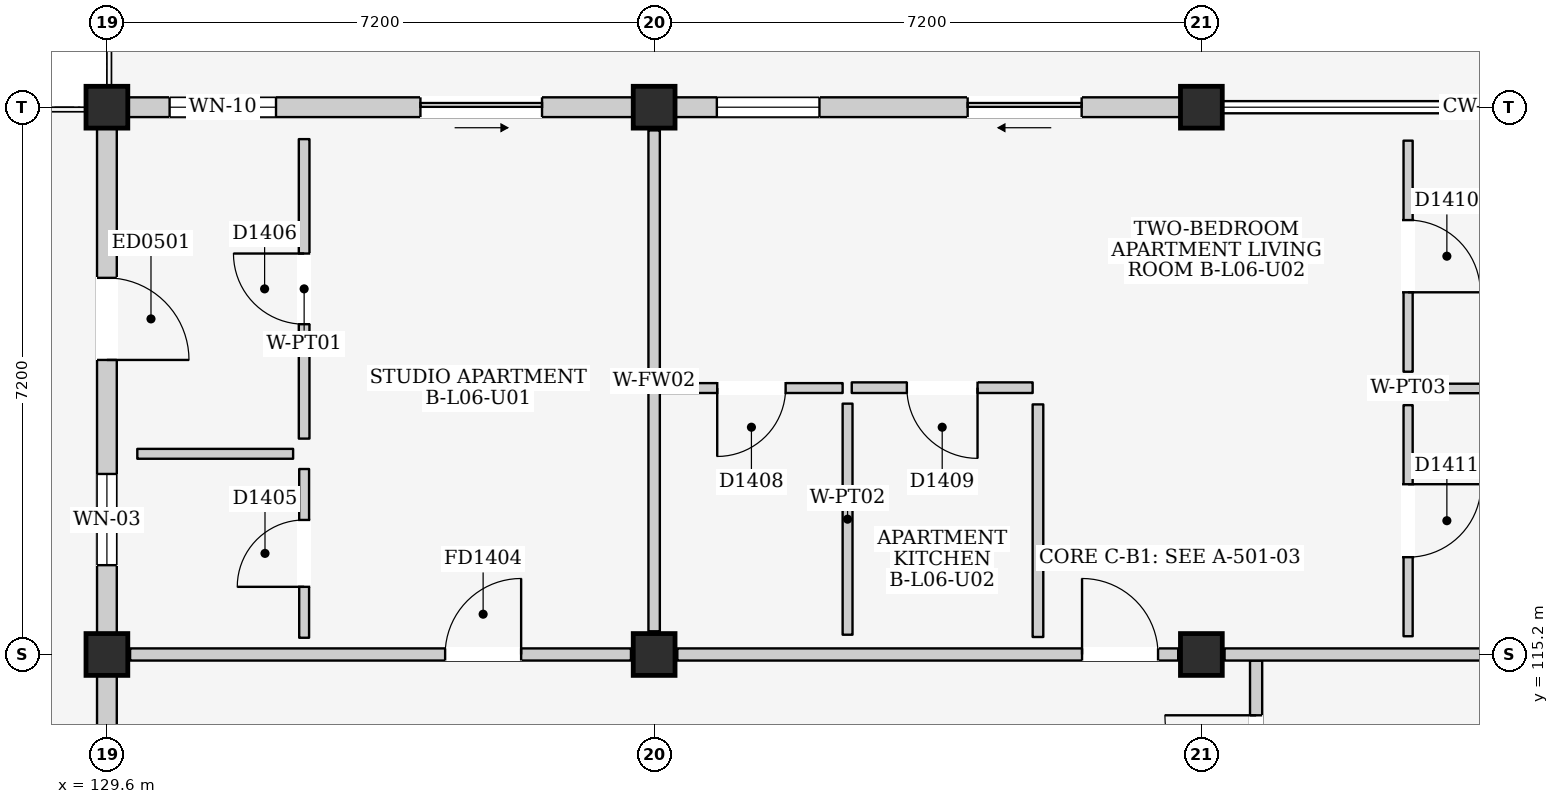
"""IFC4 building model, lengths in metres.
Left out: names, types, materials, properties, quantities, classifications, styles, units other than length and angle.
Written with IfcOpenShell. Run it as: python <this file> out.ifc"""

import sys

from ifc_helpers import new_model, si_unit, direction, frame, frame_2d, origin, origin_2d, place, context, subcontext, project, spatial, rectangle, extrude, element, fill, save


model = new_model("IFC4")
c1 = context("Model", 3, precision=1e-05, world=origin(), true_north=direction((0.0, 1.0)))
c2 = subcontext(c1, "Body", "Model", "MODEL_VIEW")
j1 = project(units=[si_unit("LENGTHUNIT", "METRE"), si_unit("PLANEANGLEUNIT", "RADIAN")], contexts=[c1])
p1 = place(None, origin())
s1 = spatial("IfcSite", under=j1, at=p1, CompositionType="ELEMENT")
p2 = place(p1, origin())
s2 = spatial("IfcBuilding", under=s1, at=p2, CompositionType="ELEMENT")
p3 = place(p2, frame((0.0, 0.0, 21.9)))
s3 = spatial("IfcBuildingStorey", under=s2, at=p3, CompositionType="ELEMENT", Elevation=21.9)
for number, where, z_axis, x_axis in (
    (1, (129.6, 115.2, 0.0), (0.0, 0.0, 1.0), (1.0, 0.0, 0.0)),
    (2, (129.6, 122.4, 0.0), (0.0, 0.0, 1.0), (1.0, 0.0, 0.0)),
    (3, (136.8, 115.2, 0.0), (0.0, 0.0, 1.0), (1.0, 0.0, 0.0)),
    (4, (136.8, 122.4, 0.0), (0.0, 0.0, 1.0), (1.0, 0.0, 0.0)),
    (5, (144.0, 115.2, 0.0), (0.0, 0.0, 1.0), (1.0, 0.0, 0.0)),
    (6, (144.0, 122.4, 0.0), (0.0, 0.0, 1.0), (1.0, 0.0, 0.0)),
):
    element("IfcColumn", number, at=place(p3, frame(where, z_axis=z_axis, x_axis=x_axis)), inside=s3, PredefinedType="COLUMN", context=c2, shape_type="SweptSolid", body=[
        extrude(rectangle(XDim=0.55, YDim=0.55, at=origin_2d()), origin(), (0.0, 0.0, 1.0), 3.2),
    ])
p4 = place(p3, frame((129.6, 108.275, 0.0), z_axis=(0.0, 0.0, 1.0), x_axis=(0.0, 1.0, 0.0)))
e7 = element("IfcWall", 7, at=p4, inside=s3, PredefinedType="ELEMENTEDWALL", context=c2, shape_type="SweptSolid", body=[
    extrude(rectangle(XDim=6.65, YDim=0.26, at=frame_2d((3.325, 0.0))), origin(), (0.0, 0.0, 1.0), 2.465),
])
p5 = place(p4, frame((2.825, 0.0, 1.1)))
e8 = element("IfcOpeningElement", 8, at=p5, cuts=e7, PredefinedType="OPENING", context=c2, shape_type="SweptSolid", body=[
    extrude(rectangle(XDim=1.0, YDim=0.9, at=frame_2d((0.5, 0.45))), frame((0.0, 0.145, 0.0), z_axis=(0.0, -1.0, 0.0), x_axis=(1.0, 0.0, 0.0)), (0.0, 0.0, 1.0), 0.29),
])
p6 = place(p3, frame((129.875, 122.4, 0.0), z_axis=(0.0, 0.0, 1.0), x_axis=(1.0, 0.0, 0.0)))
e9 = element("IfcWall", 9, at=p6, inside=s3, PredefinedType="ELEMENTEDWALL", context=c2, shape_type="SweptSolid", body=[
    extrude(rectangle(XDim=6.65, YDim=0.26, at=frame_2d((3.325, 0.0))), origin(), (0.0, 0.0, 1.0), 2.515),
])
p7 = place(p6, frame((3.85, 0.0, 0.0)))
e10 = element("IfcOpeningElement", 10, at=p7, cuts=e9, PredefinedType="OPENING", context=c2, shape_type="SweptSolid", body=[
    extrude(rectangle(XDim=1.6, YDim=2.12, at=frame_2d((0.8, 1.06))), frame((0.0, 0.145, 0.0), z_axis=(0.0, -1.0, 0.0), x_axis=(1.0, 0.0, 0.0)), (0.0, 0.0, 1.0), 0.29),
])
p8 = place(p6, frame((0.55, 0.0, 0.9)))
e11 = element("IfcOpeningElement", 11, at=p8, cuts=e9, PredefinedType="OPENING", context=c2, shape_type="SweptSolid", body=[
    extrude(rectangle(XDim=1.4, YDim=1.2, at=frame_2d((0.7, 0.6))), frame((0.0, 0.145, 0.0), z_axis=(0.0, -1.0, 0.0), x_axis=(1.0, 0.0, 0.0)), (0.0, 0.0, 1.0), 0.29),
])
p9 = place(p3, frame((129.6, 115.475, 0.0), z_axis=(0.0, 0.0, 1.0), x_axis=(0.0, 1.0, 0.0)))
e12 = element("IfcWall", 12, at=p9, inside=s3, PredefinedType="ELEMENTEDWALL", context=c2, shape_type="SweptSolid", body=[
    extrude(rectangle(XDim=6.65, YDim=0.26, at=frame_2d((3.325, 0.0))), origin(), (0.0, 0.0, 1.0), 2.465),
])
p10 = place(p9, frame((3.6, 0.0, 0.0)))
e13 = element("IfcOpeningElement", 13, at=p10, cuts=e12, PredefinedType="OPENING", context=c2, shape_type="SweptSolid", body=[
    extrude(rectangle(XDim=1.08, YDim=2.12, at=frame_2d((0.54, 1.06))), frame((0.0, 0.145, 0.0), z_axis=(0.0, -1.0, 0.0), x_axis=(1.0, 0.0, 0.0)), (0.0, 0.0, 1.0), 0.29),
])
p11 = place(p9, frame((0.9, 0.0, 0.95)))
e14 = element("IfcOpeningElement", 14, at=p11, cuts=e12, PredefinedType="OPENING", context=c2, shape_type="SweptSolid", body=[
    extrude(rectangle(XDim=1.2, YDim=1.35, at=frame_2d((0.6, 0.675))), frame((0.0, 0.145, 0.0), z_axis=(0.0, -1.0, 0.0), x_axis=(1.0, 0.0, 0.0)), (0.0, 0.0, 1.0), 0.29),
])
p12 = place(p3, frame((137.075, 122.4, 0.0), z_axis=(0.0, 0.0, 1.0), x_axis=(1.0, 0.0, 0.0)))
e15 = element("IfcWall", 15, at=p12, inside=s3, PredefinedType="ELEMENTEDWALL", context=c2, shape_type="SweptSolid", body=[
    extrude(rectangle(XDim=6.65, YDim=0.26, at=frame_2d((3.325, 0.0))), origin(), (0.0, 0.0, 1.0), 2.515),
])
p13 = place(p12, frame((3.85, 0.0, 0.0)))
e16 = element("IfcOpeningElement", 16, at=p13, cuts=e15, PredefinedType="OPENING", context=c2, shape_type="SweptSolid", body=[
    extrude(rectangle(XDim=1.5, YDim=2.12, at=frame_2d((0.75, 1.06))), frame((0.0, 0.145, 0.0), z_axis=(0.0, -1.0, 0.0), x_axis=(1.0, 0.0, 0.0)), (0.0, 0.0, 1.0), 0.29),
])
p14 = place(p12, frame((0.55, 0.0, 0.9)))
e17 = element("IfcOpeningElement", 17, at=p14, cuts=e15, PredefinedType="OPENING", context=c2, shape_type="SweptSolid", body=[
    extrude(rectangle(XDim=1.35, YDim=1.5, at=frame_2d((0.675, 0.75))), frame((0.0, 0.145, 0.0), z_axis=(0.0, -1.0, 0.0), x_axis=(1.0, 0.0, 0.0)), (0.0, 0.0, 1.0), 0.29),
])
p15 = place(p3, frame((144.72, 111.1, 0.0), z_axis=(0.0, 0.0, 1.0), x_axis=(0.0, 1.0, 0.0)))
e18 = element("IfcWall", 18, at=p15, inside=s3, PredefinedType="PARTITIONING", context=c2, shape_type="SweptSolid", body=[
    extrude(rectangle(XDim=4.02, YDim=0.16, at=frame_2d((2.01, 0.0))), origin(), (0.0, 0.0, 1.0), 2.98),
])
p16 = place(p15, frame((2.1, 0.0, 0.0)))
e19 = element("IfcOpeningElement", 19, at=p16, cuts=e18, PredefinedType="OPENING", context=c2, shape_type="SweptSolid", body=[
    extrude(rectangle(XDim=1.2, YDim=2.2, at=frame_2d((0.6, 1.1))), frame((0.0, 0.095, 0.0), z_axis=(0.0, -1.0, 0.0), x_axis=(1.0, 0.0, 0.0)), (0.0, 0.0, 1.0), 0.19),
])
p17 = place(p3, frame((129.905, 115.2, 0.0), z_axis=(0.0, 0.0, 1.0), x_axis=(1.0, 0.0, 0.0)))
e20 = element("IfcWall", 20, at=p17, inside=s3, PredefinedType="PARTITIONING", context=c2, shape_type="SweptSolid", body=[
    extrude(rectangle(XDim=6.59, YDim=0.16, at=frame_2d((3.295, 0.0))), origin(), (0.0, 0.0, 1.0), 2.365),
])
p18 = place(p17, frame((4.145, 0.0, 0.0)))
e21 = element("IfcOpeningElement", 21, at=p18, cuts=e20, PredefinedType="OPENING", context=c2, shape_type="SweptSolid", body=[
    extrude(rectangle(XDim=1.0, YDim=2.15, at=frame_2d((0.5, 1.075))), frame((0.0, 0.095, 0.0), z_axis=(0.0, -1.0, 0.0), x_axis=(1.0, 0.0, 0.0)), (0.0, 0.0, 1.0), 0.19),
])
p19 = place(p3, frame((136.8, 115.505, 0.0), z_axis=(0.0, 0.0, 1.0), x_axis=(0.0, 1.0, 0.0)))
e22 = element("IfcWall", 22, at=p19, inside=s3, PredefinedType="PARTITIONING", context=c2, shape_type="SweptSolid", body=[
    extrude(rectangle(XDim=6.59, YDim=0.15, at=frame_2d((3.295, 0.0))), origin(), (0.0, 0.0, 1.0), 2.465),
])
p20 = place(p3, frame((130.0, 117.84, 0.0), z_axis=(0.0, 0.0, 1.0), x_axis=(1.0, 0.0, 0.0)))
e23 = element("IfcWall", 23, at=p20, inside=s3, PredefinedType="PARTITIONING", context=c2, shape_type="SweptSolid", body=[
    extrude(rectangle(XDim=2.05, YDim=0.13, at=frame_2d((1.025, 0.0))), origin(), (0.0, 0.0, 1.0), 2.98),
])
p21 = place(p3, frame((132.195, 115.42, 0.0), z_axis=(0.0, 0.0, 1.0), x_axis=(0.0, 1.0, 0.0)))
e24 = element("IfcWall", 24, at=p21, inside=s3, PredefinedType="PARTITIONING", context=c2, shape_type="SweptSolid", body=[
    extrude(rectangle(XDim=2.22, YDim=0.13, at=frame_2d((1.11, 0.0))), origin(), (0.0, 0.0, 1.0), 2.98),
])
p22 = place(p21, frame((0.67, 0.0, 0.0)))
e25 = element("IfcOpeningElement", 25, at=p22, cuts=e24, PredefinedType="OPENING", context=c2, shape_type="SweptSolid", body=[
    extrude(rectangle(XDim=0.88, YDim=2.1, at=frame_2d((0.44, 1.05))), frame((0.0, 0.08, 0.0), z_axis=(0.0, -1.0, 0.0), x_axis=(1.0, 0.0, 0.0)), (0.0, 0.0, 1.0), 0.16),
])
p23 = place(p3, frame((132.195, 118.04, 0.0), z_axis=(0.0, 0.0, 1.0), x_axis=(0.0, 1.0, 0.0)))
e26 = element("IfcWall", 26, at=p23, inside=s3, PredefinedType="PARTITIONING", context=c2, shape_type="SweptSolid", body=[
    extrude(rectangle(XDim=3.94, YDim=0.14, at=frame_2d((1.97, 0.0))), origin(), (0.0, 0.0, 1.0), 2.98),
])
p24 = place(p23, frame((1.505, 0.0, 0.0)))
e27 = element("IfcOpeningElement", 27, at=p24, cuts=e26, PredefinedType="OPENING", context=c2, shape_type="SweptSolid", body=[
    extrude(rectangle(XDim=0.93, YDim=2.14, at=frame_2d((0.465, 1.07))), frame((0.0, 0.085, 0.0), z_axis=(0.0, -1.0, 0.0), x_axis=(1.0, 0.0, 0.0)), (0.0, 0.0, 1.0), 0.17),
])
p25 = place(p3, frame((137.105, 115.2, 0.0), z_axis=(0.0, 0.0, 1.0), x_axis=(1.0, 0.0, 0.0)))
e28 = element("IfcWall", 28, at=p25, inside=s3, PredefinedType="PARTITIONING", context=c2, shape_type="SweptSolid", body=[
    extrude(rectangle(XDim=6.59, YDim=0.16, at=frame_2d((3.295, 0.0))), origin(), (0.0, 0.0, 1.0), 2.365),
])
p26 = place(p25, frame((5.325, 0.0, 0.0)))
e29 = element("IfcOpeningElement", 29, at=p26, cuts=e28, PredefinedType="OPENING", context=c2, shape_type="SweptSolid", body=[
    extrude(rectangle(XDim=1.0, YDim=2.15, at=frame_2d((0.5, 1.075))), frame((0.0, 0.095, 0.0), z_axis=(0.0, -1.0, 0.0), x_axis=(1.0, 0.0, 0.0)), (0.0, 0.0, 1.0), 0.19),
])
p27 = place(p3, frame((144.305, 115.2, 0.0), z_axis=(0.0, 0.0, 1.0), x_axis=(1.0, 0.0, 0.0)))
e30 = element("IfcWall", 30, at=p27, inside=s3, PredefinedType="PARTITIONING", context=c2, shape_type="SweptSolid", body=[
    extrude(rectangle(XDim=6.59, YDim=0.16, at=frame_2d((3.295, 0.0))), origin(), (0.0, 0.0, 1.0), 2.365),
])
p28 = place(p3, frame((136.88, 118.705, 0.0), z_axis=(0.0, 0.0, 1.0), x_axis=(1.0, 0.0, 0.0)))
e31 = element("IfcWall", 31, at=p28, inside=s3, PredefinedType="PARTITIONING", context=c2, shape_type="SweptSolid", body=[
    extrude(rectangle(XDim=2.4, YDim=0.13, at=frame_2d((1.2, 0.0))), origin(), (0.0, 0.0, 1.0), 2.98),
])
p29 = place(p28, frame((0.75, 0.0, 0.0)))
e32 = element("IfcOpeningElement", 32, at=p29, cuts=e31, PredefinedType="OPENING", context=c2, shape_type="SweptSolid", body=[
    extrude(rectangle(XDim=0.9, YDim=2.1, at=frame_2d((0.45, 1.05))), frame((0.0, 0.08, 0.0), z_axis=(0.0, -1.0, 0.0), x_axis=(1.0, 0.0, 0.0)), (0.0, 0.0, 1.0), 0.16),
])
p30 = place(p3, frame((139.345, 115.46, 0.0), z_axis=(0.0, 0.0, 1.0), x_axis=(0.0, 1.0, 0.0)))
e33 = element("IfcWall", 33, at=p30, inside=s3, PredefinedType="PARTITIONING", context=c2, shape_type="SweptSolid", body=[
    extrude(rectangle(XDim=3.04, YDim=0.13, at=frame_2d((1.52, 0.0))), origin(), (0.0, 0.0, 1.0), 2.98),
])
p31 = place(p3, frame((139.4, 118.71, 0.0), z_axis=(0.0, 0.0, 1.0), x_axis=(1.0, 0.0, 0.0)))
e34 = element("IfcWall", 34, at=p31, inside=s3, PredefinedType="PARTITIONING", context=c2, shape_type="SweptSolid", body=[
    extrude(rectangle(XDim=2.38, YDim=0.14, at=frame_2d((1.19, 0.0))), origin(), (0.0, 0.0, 1.0), 2.98),
])
p32 = place(p31, frame((0.725, 0.0, 0.0)))
e35 = element("IfcOpeningElement", 35, at=p32, cuts=e34, PredefinedType="OPENING", context=c2, shape_type="SweptSolid", body=[
    extrude(rectangle(XDim=0.93, YDim=2.14, at=frame_2d((0.465, 1.07))), frame((0.0, 0.085, 0.0), z_axis=(0.0, -1.0, 0.0), x_axis=(1.0, 0.0, 0.0)), (0.0, 0.0, 1.0), 0.17),
])
p33 = place(p3, frame((141.85, 115.43, 0.0), z_axis=(0.0, 0.0, 1.0), x_axis=(0.0, 1.0, 0.0)))
e36 = element("IfcWall", 36, at=p33, inside=s3, PredefinedType="PARTITIONING", context=c2, shape_type="SweptSolid", body=[
    extrude(rectangle(XDim=3.06, YDim=0.14, at=frame_2d((1.53, 0.0))), origin(), (0.0, 0.0, 1.0), 2.98),
])
p34 = place(p3, frame((146.72, 118.92, 0.0), z_axis=(0.0, 0.0, 1.0), x_axis=(0.0, 1.0, 0.0)))
e37 = element("IfcWall", 37, at=p34, inside=s3, PredefinedType="PARTITIONING", context=c2, shape_type="SweptSolid", body=[
    extrude(rectangle(XDim=3.04, YDim=0.12, at=frame_2d((1.52, 0.0))), origin(), (0.0, 0.0, 1.0), 2.98),
])
p35 = place(p34, frame((1.045, 0.0, 0.0)))
e38 = element("IfcOpeningElement", 38, at=p35, cuts=e37, PredefinedType="OPENING", context=c2, shape_type="SweptSolid", body=[
    extrude(rectangle(XDim=0.95, YDim=2.15, at=frame_2d((0.475, 1.075))), frame((0.0, 0.075, 0.0), z_axis=(0.0, -1.0, 0.0), x_axis=(1.0, 0.0, 0.0)), (0.0, 0.0, 1.0), 0.15),
])
p36 = place(p3, frame((146.92, 118.7, 0.0), z_axis=(0.0, 0.0, 1.0), x_axis=(1.0, 0.0, 0.0)))
e39 = element("IfcWall", 39, at=p36, inside=s3, PredefinedType="PARTITIONING", context=c2, shape_type="SweptSolid", body=[
    extrude(rectangle(XDim=4.06, YDim=0.125, at=frame_2d((2.03, 0.0))), origin(), (0.0, 0.0, 1.0), 2.98),
])
p37 = place(p3, frame((146.72, 115.44, 0.0), z_axis=(0.0, 0.0, 1.0), x_axis=(0.0, 1.0, 0.0)))
e40 = element("IfcWall", 40, at=p37, inside=s3, PredefinedType="PARTITIONING", context=c2, shape_type="SweptSolid", body=[
    extrude(rectangle(XDim=3.04, YDim=0.12, at=frame_2d((1.52, 0.0))), origin(), (0.0, 0.0, 1.0), 2.98),
])
p38 = place(p37, frame((1.04, 0.0, 0.0)))
e41 = element("IfcOpeningElement", 41, at=p38, cuts=e40, PredefinedType="OPENING", context=c2, shape_type="SweptSolid", body=[
    extrude(rectangle(XDim=0.96, YDim=2.15, at=frame_2d((0.48, 1.075))), frame((0.0, 0.075, 0.0), z_axis=(0.0, -1.0, 0.0), x_axis=(1.0, 0.0, 0.0)), (0.0, 0.0, 1.0), 0.15),
])
p39 = place(p7, frame((1.6, 0.0, 0.0), z_axis=(0.0, 0.0, 1.0), x_axis=(-1.0, 0.0, 0.0)))
e42 = element("IfcDoor", 42, at=p39, inside=s3, OperationType="SLIDING_TO_RIGHT", PredefinedType="DOOR", context=c2, shape_type="SweptSolid", body=[
    extrude(rectangle(XDim=1.6, YDim=2.12, at=frame_2d((0.8, 1.06))), frame((0.0, 0.025, 0.0), z_axis=(0.0, -1.0, 0.0), x_axis=(1.0, 0.0, 0.0)), (0.0, 0.0, 1.0), 0.05),
])
fill(e10, e42)
p40 = place(p8, origin())
e43 = element("IfcWindow", 43, at=p40, inside=s3, PartitioningType="DOUBLE_PANEL_HORIZONTAL", PredefinedType="WINDOW", context=c2, shape_type="SweptSolid", body=[
    extrude(rectangle(XDim=1.4, YDim=1.2, at=frame_2d((0.7, 0.6))), frame((0.0, 0.03, 0.0), z_axis=(0.0, -1.0, 0.0), x_axis=(1.0, 0.0, 0.0)), (0.0, 0.0, 1.0), 0.06),
])
fill(e11, e43)
p41 = place(p10, frame((1.08, 0.0, 0.0), z_axis=(0.0, 0.0, 1.0), x_axis=(-1.0, 0.0, 0.0)))
e44 = element("IfcDoor", 44, at=p41, inside=s3, OperationType="SINGLE_SWING_RIGHT", PredefinedType="DOOR", context=c2, shape_type="SweptSolid", body=[
    extrude(rectangle(XDim=1.08, YDim=2.12, at=frame_2d((0.54, 1.06))), frame((0.0, 0.025, 0.0), z_axis=(0.0, -1.0, 0.0), x_axis=(1.0, 0.0, 0.0)), (0.0, 0.0, 1.0), 0.05),
])
fill(e13, e44)
p42 = place(p11, origin())
e45 = element("IfcWindow", 45, at=p42, inside=s3, PartitioningType="SINGLE_PANEL", PredefinedType="WINDOW", context=c2, shape_type="SweptSolid", body=[
    extrude(rectangle(XDim=1.2, YDim=1.35, at=frame_2d((0.6, 0.675))), frame((0.0, 0.03, 0.0), z_axis=(0.0, -1.0, 0.0), x_axis=(1.0, 0.0, 0.0)), (0.0, 0.0, 1.0), 0.06),
])
fill(e14, e45)
p43 = place(p13, frame((1.5, 0.0, 0.0), z_axis=(0.0, 0.0, 1.0), x_axis=(-1.0, 0.0, 0.0)))
e46 = element("IfcDoor", 46, at=p43, inside=s3, OperationType="SLIDING_TO_LEFT", PredefinedType="DOOR", context=c2, shape_type="SweptSolid", body=[
    extrude(rectangle(XDim=1.5, YDim=2.12, at=frame_2d((0.75, 1.06))), frame((0.0, 0.025, 0.0), z_axis=(0.0, -1.0, 0.0), x_axis=(1.0, 0.0, 0.0)), (0.0, 0.0, 1.0), 0.05),
])
fill(e16, e46)
p44 = place(p14, origin())
e47 = element("IfcWindow", 47, at=p44, inside=s3, PartitioningType="SINGLE_PANEL", PredefinedType="WINDOW", context=c2, shape_type="SweptSolid", body=[
    extrude(rectangle(XDim=1.35, YDim=1.5, at=frame_2d((0.675, 0.75))), frame((0.0, 0.03, 0.0), z_axis=(0.0, -1.0, 0.0), x_axis=(1.0, 0.0, 0.0)), (0.0, 0.0, 1.0), 0.06),
])
fill(e17, e47)
p45 = place(p16, origin())
e48 = element("IfcDoor", 48, at=p45, inside=s3, OperationType="SINGLE_SWING_RIGHT", PredefinedType="DOOR", context=c2, shape_type="SweptSolid", body=[
    extrude(rectangle(XDim=1.2, YDim=2.2, at=frame_2d((0.6, 1.1))), frame((0.0, 0.025, 0.0), z_axis=(0.0, -1.0, 0.0), x_axis=(1.0, 0.0, 0.0)), (0.0, 0.0, 1.0), 0.05),
])
fill(e19, e48)
p46 = place(p18, origin())
e49 = element("IfcDoor", 49, at=p46, inside=s3, OperationType="SINGLE_SWING_RIGHT", PredefinedType="DOOR", context=c2, shape_type="SweptSolid", body=[
    extrude(rectangle(XDim=1.0, YDim=2.15, at=frame_2d((0.5, 1.075))), frame((0.0, 0.025, 0.0), z_axis=(0.0, -1.0, 0.0), x_axis=(1.0, 0.0, 0.0)), (0.0, 0.0, 1.0), 0.05),
])
fill(e21, e49)
p47 = place(p22, origin())
e50 = element("IfcDoor", 50, at=p47, inside=s3, OperationType="SINGLE_SWING_LEFT", PredefinedType="DOOR", context=c2, shape_type="SweptSolid", body=[
    extrude(rectangle(XDim=0.88, YDim=2.1, at=frame_2d((0.44, 1.05))), frame((0.0, 0.025, 0.0), z_axis=(0.0, -1.0, 0.0), x_axis=(1.0, 0.0, 0.0)), (0.0, 0.0, 1.0), 0.05),
])
fill(e25, e50)
p48 = place(p24, origin())
e51 = element("IfcDoor", 51, at=p48, inside=s3, OperationType="SINGLE_SWING_RIGHT", PredefinedType="DOOR", context=c2, shape_type="SweptSolid", body=[
    extrude(rectangle(XDim=0.93, YDim=2.14, at=frame_2d((0.465, 1.07))), frame((0.0, 0.025, 0.0), z_axis=(0.0, -1.0, 0.0), x_axis=(1.0, 0.0, 0.0)), (0.0, 0.0, 1.0), 0.05),
])
fill(e27, e51)
p49 = place(p26, origin())
e52 = element("IfcDoor", 52, at=p49, inside=s3, OperationType="SINGLE_SWING_LEFT", PredefinedType="DOOR", context=c2, shape_type="SweptSolid", body=[
    extrude(rectangle(XDim=1.0, YDim=2.15, at=frame_2d((0.5, 1.075))), frame((0.0, 0.025, 0.0), z_axis=(0.0, -1.0, 0.0), x_axis=(1.0, 0.0, 0.0)), (0.0, 0.0, 1.0), 0.05),
])
fill(e29, e52)
p50 = place(p29, frame((0.9, 0.0, 0.0), z_axis=(0.0, 0.0, 1.0), x_axis=(-1.0, 0.0, 0.0)))
e53 = element("IfcDoor", 53, at=p50, inside=s3, OperationType="SINGLE_SWING_RIGHT", PredefinedType="DOOR", context=c2, shape_type="SweptSolid", body=[
    extrude(rectangle(XDim=0.9, YDim=2.1, at=frame_2d((0.45, 1.05))), frame((0.0, 0.025, 0.0), z_axis=(0.0, -1.0, 0.0), x_axis=(1.0, 0.0, 0.0)), (0.0, 0.0, 1.0), 0.05),
])
fill(e32, e53)
p51 = place(p32, frame((0.93, 0.0, 0.0), z_axis=(0.0, 0.0, 1.0), x_axis=(-1.0, 0.0, 0.0)))
e54 = element("IfcDoor", 54, at=p51, inside=s3, OperationType="SINGLE_SWING_LEFT", PredefinedType="DOOR", context=c2, shape_type="SweptSolid", body=[
    extrude(rectangle(XDim=0.93, YDim=2.14, at=frame_2d((0.465, 1.07))), frame((0.0, 0.025, 0.0), z_axis=(0.0, -1.0, 0.0), x_axis=(1.0, 0.0, 0.0)), (0.0, 0.0, 1.0), 0.05),
])
fill(e35, e54)
p52 = place(p35, frame((0.95, 0.0, 0.0), z_axis=(0.0, 0.0, 1.0), x_axis=(-1.0, 0.0, 0.0)))
e55 = element("IfcDoor", 55, at=p52, inside=s3, OperationType="SINGLE_SWING_RIGHT", PredefinedType="DOOR", context=c2, shape_type="SweptSolid", body=[
    extrude(rectangle(XDim=0.95, YDim=2.15, at=frame_2d((0.475, 1.075))), frame((0.0, 0.025, 0.0), z_axis=(0.0, -1.0, 0.0), x_axis=(1.0, 0.0, 0.0)), (0.0, 0.0, 1.0), 0.05),
])
fill(e38, e55)
p53 = place(p38, frame((0.96, 0.0, 0.0), z_axis=(0.0, 0.0, 1.0), x_axis=(-1.0, 0.0, 0.0)))
e56 = element("IfcDoor", 56, at=p53, inside=s3, OperationType="SINGLE_SWING_LEFT", PredefinedType="DOOR", context=c2, shape_type="SweptSolid", body=[
    extrude(rectangle(XDim=0.96, YDim=2.15, at=frame_2d((0.48, 1.075))), frame((0.0, 0.025, 0.0), z_axis=(0.0, -1.0, 0.0), x_axis=(1.0, 0.0, 0.0)), (0.0, 0.0, 1.0), 0.05),
])
fill(e41, e56)
save(model, sys.argv[1])
